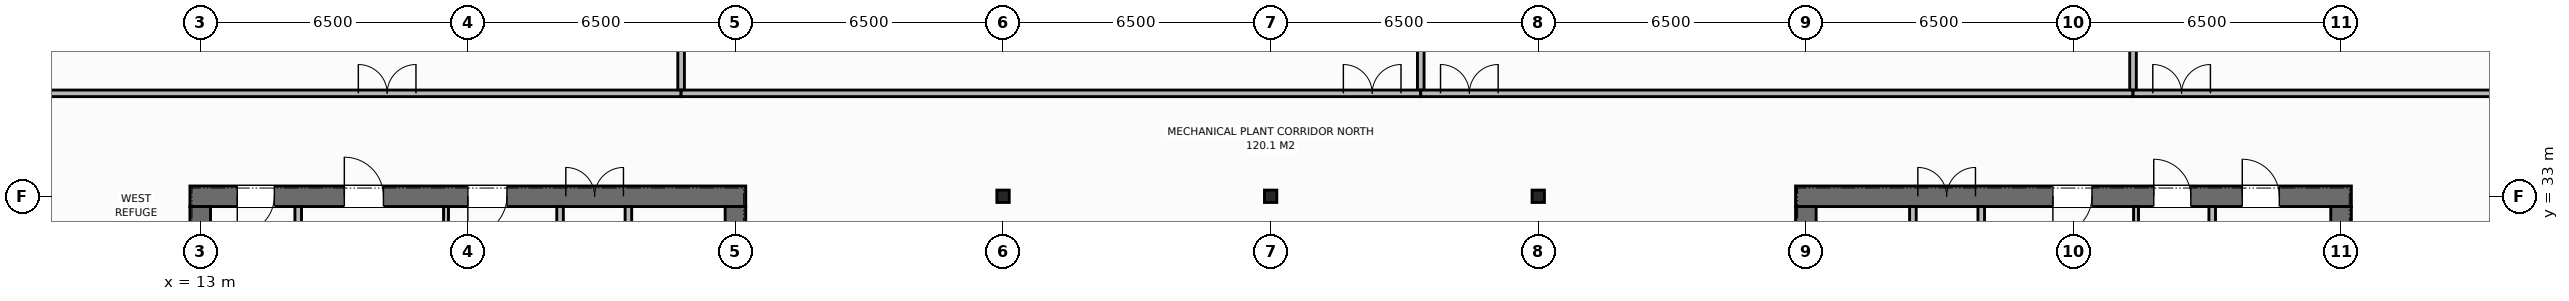
"""IFC4 building model, lengths in metres.
Left out: names, types, materials, properties, quantities, classifications, styles, units other than length and angle.
Written with IfcOpenShell. Run it as: python <this file> out.ifc"""

import sys

from ifc_helpers import new_model, si_unit, direction, frame, frame_2d, origin, origin_2d, place, context, subcontext, project, spatial, rectangle, i_section, extrude, element, fill, save


model = new_model("IFC4")
c1 = context("Model", 3, precision=1e-05, world=origin(), true_north=direction((0.0, 1.0)))
c2 = subcontext(c1, "Body", "Model", "MODEL_VIEW")
j1 = project(units=[si_unit("LENGTHUNIT", "METRE"), si_unit("PLANEANGLEUNIT", "RADIAN")], contexts=[c1])
p1 = place(None, origin())
s1 = spatial("IfcSite", under=j1, at=p1, CompositionType="ELEMENT")
p2 = place(p1, origin())
s2 = spatial("IfcBuilding", under=s1, at=p2, CompositionType="ELEMENT")
p3 = place(p2, frame((0.0, 0.0, 310.4)))
s3 = spatial("IfcBuildingStorey", under=s2, at=p3, CompositionType="ELEMENT", Elevation=310.4)
p4 = place(p3, frame((12.75, 33.0, 0.0), z_axis=(0.0, 0.0, 1.0), x_axis=(1.0, 0.0, 0.0)))
e1 = element("IfcWall", 1, at=p4, inside=s3, PredefinedType="SHEAR", context=c2, shape_type="SweptSolid", body=[
    extrude(rectangle(XDim=13.5, YDim=0.5, at=frame_2d((6.75, 0.0))), origin(), (0.0, 0.0, 1.0), 5.0),
])
p5 = place(p4, frame((1.15, 0.0, 0.0)))
e2 = element("IfcOpeningElement", 2, at=p5, cuts=e1, PredefinedType="OPENING", context=c2, shape_type="SweptSolid", body=[
    extrude(rectangle(XDim=0.9, YDim=2.15, at=frame_2d((0.45, 1.075))), frame((0.0, 0.26, 0.0), z_axis=(0.0, -1.0, 0.0), x_axis=(1.0, 0.0, 0.0)), (0.0, 0.0, 1.0), 0.52),
])
p6 = place(p4, frame((3.75, 0.0, 0.0)))
e3 = element("IfcOpeningElement", 3, at=p6, cuts=e1, PredefinedType="OPENING", context=c2, shape_type="SweptSolid", body=[
    extrude(rectangle(XDim=0.95, YDim=2.15, at=frame_2d((0.475, 1.075))), frame((0.0, 0.26, 0.0), z_axis=(0.0, -1.0, 0.0), x_axis=(1.0, 0.0, 0.0)), (0.0, 0.0, 1.0), 0.52),
])
p7 = place(p4, frame((6.75, 0.0, 0.0)))
e4 = element("IfcOpeningElement", 4, at=p7, cuts=e1, PredefinedType="OPENING", context=c2, shape_type="SweptSolid", body=[
    extrude(rectangle(XDim=0.95, YDim=2.15, at=frame_2d((0.475, 1.075))), frame((0.0, 0.26, 0.0), z_axis=(0.0, -1.0, 0.0), x_axis=(1.0, 0.0, 0.0)), (0.0, 0.0, 1.0), 0.52),
])
p8 = place(p4, frame((9.13, 0.0, 0.0)))
e5 = element("IfcOpeningElement", 5, at=p8, cuts=e1, PredefinedType="OPENING", context=c2, shape_type="SweptSolid", body=[
    extrude(rectangle(XDim=1.4, YDim=2.2, at=frame_2d((0.7, 1.1))), frame((0.0, 0.26, 0.0), z_axis=(0.0, -1.0, 0.0), x_axis=(1.0, 0.0, 0.0)), (0.0, 0.0, 1.0), 0.52),
])
p9 = place(p3, frame((13.0, 19.25, 0.0), z_axis=(0.0, 0.0, 1.0), x_axis=(0.0, 1.0, 0.0)))
e6 = element("IfcWall", 6, at=p9, inside=s3, PredefinedType="SHEAR", context=c2, shape_type="SweptSolid", body=[
    extrude(rectangle(XDim=13.5, YDim=0.5, at=frame_2d((6.75, 0.0))), origin(), (0.0, 0.0, 1.0), 5.0),
])
p10 = place(p9, frame((4.8, 0.0, 0.0)))
e7 = element("IfcOpeningElement", 7, at=p10, cuts=e6, PredefinedType="OPENING", context=c2, shape_type="SweptSolid", body=[
    extrude(rectangle(XDim=1.4, YDim=2.2, at=frame_2d((0.7, 1.1))), frame((0.0, 0.26, 0.0), z_axis=(0.0, -1.0, 0.0), x_axis=(1.0, 0.0, 0.0)), (0.0, 0.0, 1.0), 0.52),
])
p11 = place(p3, frame((26.0, 19.25, 0.0), z_axis=(0.0, 0.0, 1.0), x_axis=(0.0, 1.0, 0.0)))
e8 = element("IfcWall", 8, at=p11, inside=s3, PredefinedType="SHEAR", context=c2, shape_type="SweptSolid", body=[
    extrude(rectangle(XDim=13.5, YDim=0.5, at=frame_2d((6.75, 0.0))), origin(), (0.0, 0.0, 1.0), 5.0),
])
p12 = place(p3, frame((51.75, 33.0, 0.0), z_axis=(0.0, 0.0, 1.0), x_axis=(1.0, 0.0, 0.0)))
e9 = element("IfcWall", 9, at=p12, inside=s3, PredefinedType="SHEAR", context=c2, shape_type="SweptSolid", body=[
    extrude(rectangle(XDim=13.5, YDim=0.5, at=frame_2d((6.75, 0.0))), origin(), (0.0, 0.0, 1.0), 5.0),
])
p13 = place(p12, frame((2.97, 0.0, 0.0)))
e10 = element("IfcOpeningElement", 10, at=p13, cuts=e9, PredefinedType="OPENING", context=c2, shape_type="SweptSolid", body=[
    extrude(rectangle(XDim=1.4, YDim=2.2, at=frame_2d((0.7, 1.1))), frame((0.0, 0.26, 0.0), z_axis=(0.0, -1.0, 0.0), x_axis=(1.0, 0.0, 0.0)), (0.0, 0.0, 1.0), 0.52),
])
p14 = place(p12, frame((10.85, 0.0, 0.0)))
e11 = element("IfcOpeningElement", 11, at=p14, cuts=e9, PredefinedType="OPENING", context=c2, shape_type="SweptSolid", body=[
    extrude(rectangle(XDim=0.9, YDim=2.15, at=frame_2d((0.45, 1.075))), frame((0.0, 0.26, 0.0), z_axis=(0.0, -1.0, 0.0), x_axis=(1.0, 0.0, 0.0)), (0.0, 0.0, 1.0), 0.52),
])
p15 = place(p12, frame((6.25, 0.0, 0.0)))
e12 = element("IfcOpeningElement", 12, at=p15, cuts=e9, PredefinedType="OPENING", context=c2, shape_type="SweptSolid", body=[
    extrude(rectangle(XDim=0.95, YDim=2.15, at=frame_2d((0.475, 1.075))), frame((0.0, 0.26, 0.0), z_axis=(0.0, -1.0, 0.0), x_axis=(1.0, 0.0, 0.0)), (0.0, 0.0, 1.0), 0.52),
])
p16 = place(p12, frame((8.7, 0.0, 0.0)))
e13 = element("IfcOpeningElement", 13, at=p16, cuts=e9, PredefinedType="OPENING", context=c2, shape_type="SweptSolid", body=[
    extrude(rectangle(XDim=0.9, YDim=2.15, at=frame_2d((0.45, 1.075))), frame((0.0, 0.26, 0.0), z_axis=(0.0, -1.0, 0.0), x_axis=(1.0, 0.0, 0.0)), (0.0, 0.0, 1.0), 0.52),
])
p17 = place(p3, frame((52.0, 19.25, 0.0), z_axis=(0.0, 0.0, 1.0), x_axis=(0.0, 1.0, 0.0)))
e14 = element("IfcWall", 14, at=p17, inside=s3, PredefinedType="SHEAR", context=c2, shape_type="SweptSolid", body=[
    extrude(rectangle(XDim=13.5, YDim=0.5, at=frame_2d((6.75, 0.0))), origin(), (0.0, 0.0, 1.0), 5.0),
])
p18 = place(p3, frame((65.0, 19.25, 0.0), z_axis=(0.0, 0.0, 1.0), x_axis=(0.0, 1.0, 0.0)))
e15 = element("IfcWall", 15, at=p18, inside=s3, PredefinedType="SHEAR", context=c2, shape_type="SweptSolid", body=[
    extrude(rectangle(XDim=13.5, YDim=0.5, at=frame_2d((6.75, 0.0))), origin(), (0.0, 0.0, 1.0), 5.0),
])
p19 = place(p18, frame((8.2, 0.0, 0.0)))
e16 = element("IfcOpeningElement", 16, at=p19, cuts=e15, PredefinedType="OPENING", context=c2, shape_type="SweptSolid", body=[
    extrude(rectangle(XDim=1.3, YDim=2.2, at=frame_2d((0.65, 1.1))), frame((0.0, 0.26, 0.0), z_axis=(0.0, -1.0, 0.0), x_axis=(1.0, 0.0, 0.0)), (0.0, 0.0, 1.0), 0.52),
])
for number, where, z_axis, x_axis in (
    (17, (32.5, 33.0, 0.0), (0.0, 0.0, 1.0), (1.0, 0.0, 0.0)),
    (18, (39.0, 33.0, 0.0), (0.0, 0.0, 1.0), (1.0, 0.0, 0.0)),
    (19, (45.5, 33.0, 0.0), (0.0, 0.0, 1.0), (1.0, 0.0, 0.0)),
):
    element("IfcColumn", number, at=place(p3, frame(where, z_axis=z_axis, x_axis=x_axis)), inside=s3, PredefinedType="COLUMN", context=c2, shape_type="SweptSolid", body=[
        extrude(i_section(OverallWidth=0.3, OverallDepth=0.3, WebThickness=0.011, FlangeThickness=0.019, at=origin_2d()), origin(), (0.0, 0.0, 1.0), 5.0),
    ])
p20 = place(p3, frame((15.38, 26.56, 0.0), z_axis=(0.0, 0.0, 1.0), x_axis=(0.0, 1.0, 0.0)))
e20 = element("IfcWall", 20, at=p20, inside=s3, PredefinedType="STANDARD", context=c2, shape_type="SweptSolid", body=[
    extrude(rectangle(XDim=6.19, YDim=0.16, at=frame_2d((3.095, 0.0))), origin(), (0.0, 0.0, 1.0), 4.72),
])
p21 = place(p3, frame((18.97, 26.56, 0.0), z_axis=(0.0, 0.0, 1.0), x_axis=(0.0, 1.0, 0.0)))
e21 = element("IfcWall", 21, at=p21, inside=s3, PredefinedType="PARTITIONING", context=c2, shape_type="SweptSolid", body=[
    extrude(rectangle(XDim=6.19, YDim=0.12, at=frame_2d((3.095, 0.0))), origin(), (0.0, 0.0, 1.0), 4.72),
])
p22 = place(p3, frame((21.74, 26.56, 0.0), z_axis=(0.0, 0.0, 1.0), x_axis=(0.0, 1.0, 0.0)))
e22 = element("IfcWall", 22, at=p22, inside=s3, PredefinedType="STANDARD", context=c2, shape_type="SweptSolid", body=[
    extrude(rectangle(XDim=6.19, YDim=0.16, at=frame_2d((3.095, 0.0))), origin(), (0.0, 0.0, 1.0), 4.72),
])
p23 = place(p3, frame((23.4, 19.25, 0.0), z_axis=(0.0, 0.0, 1.0), x_axis=(0.0, 1.0, 0.0)))
e23 = element("IfcWall", 23, at=p23, inside=s3, PredefinedType="STANDARD", context=c2, shape_type="SweptSolid", body=[
    extrude(rectangle(XDim=13.5, YDim=0.16, at=frame_2d((6.75, 0.0))), origin(), (0.0, 0.0, 1.0), 4.72),
])
p24 = place(p23, frame((2.25, 0.0, 0.0)))
e24 = element("IfcOpeningElement", 24, at=p24, cuts=e23, PredefinedType="OPENING", context=c2, shape_type="SweptSolid", body=[
    extrude(rectangle(XDim=0.95, YDim=2.15, at=frame_2d((0.475, 1.075))), frame((0.0, 0.09, 0.0), z_axis=(0.0, -1.0, 0.0), x_axis=(1.0, 0.0, 0.0)), (0.0, 0.0, 1.0), 0.18),
])
p25 = place(p23, frame((6.35, 0.0, 0.0)))
e25 = element("IfcOpeningElement", 25, at=p25, cuts=e23, PredefinedType="OPENING", context=c2, shape_type="SweptSolid", body=[
    extrude(rectangle(XDim=0.95, YDim=2.15, at=frame_2d((0.475, 1.075))), frame((0.0, 0.09, 0.0), z_axis=(0.0, -1.0, 0.0), x_axis=(1.0, 0.0, 0.0)), (0.0, 0.0, 1.0), 0.18),
])
p26 = place(p23, frame((9.95, 0.0, 0.0)))
e26 = element("IfcOpeningElement", 26, at=p26, cuts=e23, PredefinedType="OPENING", context=c2, shape_type="SweptSolid", body=[
    extrude(rectangle(XDim=0.95, YDim=2.15, at=frame_2d((0.475, 1.075))), frame((0.0, 0.09, 0.0), z_axis=(0.0, -1.0, 0.0), x_axis=(1.0, 0.0, 0.0)), (0.0, 0.0, 1.0), 0.18),
])
p27 = place(p3, frame((54.6, 19.25, 0.0), z_axis=(0.0, 0.0, 1.0), x_axis=(0.0, 1.0, 0.0)))
e27 = element("IfcWall", 27, at=p27, inside=s3, PredefinedType="STANDARD", context=c2, shape_type="SweptSolid", body=[
    extrude(rectangle(XDim=13.5, YDim=0.16, at=frame_2d((6.75, 0.0))), origin(), (0.0, 0.0, 1.0), 4.72),
])
p28 = place(p27, frame((2.15, 0.0, 0.0)))
e28 = element("IfcOpeningElement", 28, at=p28, cuts=e27, PredefinedType="OPENING", context=c2, shape_type="SweptSolid", body=[
    extrude(rectangle(XDim=0.95, YDim=2.15, at=frame_2d((0.475, 1.075))), frame((0.0, 0.09, 0.0), z_axis=(0.0, -1.0, 0.0), x_axis=(1.0, 0.0, 0.0)), (0.0, 0.0, 1.0), 0.18),
])
p29 = place(p27, frame((6.25, 0.0, 0.0)))
e29 = element("IfcOpeningElement", 29, at=p29, cuts=e27, PredefinedType="OPENING", context=c2, shape_type="SweptSolid", body=[
    extrude(rectangle(XDim=0.95, YDim=2.15, at=frame_2d((0.475, 1.075))), frame((0.0, 0.09, 0.0), z_axis=(0.0, -1.0, 0.0), x_axis=(1.0, 0.0, 0.0)), (0.0, 0.0, 1.0), 0.18),
])
p30 = place(p27, frame((9.95, 0.0, 0.0)))
e30 = element("IfcOpeningElement", 30, at=p30, cuts=e27, PredefinedType="OPENING", context=c2, shape_type="SweptSolid", body=[
    extrude(rectangle(XDim=0.95, YDim=2.15, at=frame_2d((0.475, 1.075))), frame((0.0, 0.09, 0.0), z_axis=(0.0, -1.0, 0.0), x_axis=(1.0, 0.0, 0.0)), (0.0, 0.0, 1.0), 0.18),
])
p31 = place(p3, frame((56.26, 23.09, 0.0), z_axis=(0.0, 0.0, 1.0), x_axis=(0.0, 1.0, 0.0)))
e31 = element("IfcWall", 31, at=p31, inside=s3, PredefinedType="STANDARD", context=c2, shape_type="SweptSolid", body=[
    extrude(rectangle(XDim=9.66, YDim=0.16, at=frame_2d((4.83, 0.0))), origin(), (0.0, 0.0, 1.0), 4.72),
])
p32 = place(p31, frame((1.01, 0.0, 0.0)))
e32 = element("IfcOpeningElement", 32, at=p32, cuts=e31, PredefinedType="OPENING", context=c2, shape_type="SweptSolid", body=[
    extrude(rectangle(XDim=1.3, YDim=2.2, at=frame_2d((0.65, 1.1))), frame((0.0, 0.09, 0.0), z_axis=(0.0, -1.0, 0.0), x_axis=(1.0, 0.0, 0.0)), (0.0, 0.0, 1.0), 0.18),
])
p33 = place(p3, frame((61.87, 26.56, 0.0), z_axis=(0.0, 0.0, 1.0), x_axis=(0.0, 1.0, 0.0)))
e33 = element("IfcWall", 33, at=p33, inside=s3, PredefinedType="STANDARD", context=c2, shape_type="SweptSolid", body=[
    extrude(rectangle(XDim=6.19, YDim=0.16, at=frame_2d((3.095, 0.0))), origin(), (0.0, 0.0, 1.0), 4.72),
])
p34 = place(p3, frame((60.02, 26.56, 0.0), z_axis=(0.0, 0.0, 1.0), x_axis=(0.0, 1.0, 0.0)))
e34 = element("IfcWall", 34, at=p34, inside=s3, PredefinedType="PARTITIONING", context=c2, shape_type="SweptSolid", body=[
    extrude(rectangle(XDim=6.19, YDim=0.12, at=frame_2d((3.095, 0.0))), origin(), (0.0, 0.0, 1.0), 4.72),
])
p35 = place(p3, frame((24.68, 35.5, 0.0), z_axis=(0.0, 0.0, 1.0), x_axis=(0.0, 1.0, 0.0)))
e35 = element("IfcWall", 35, at=p35, inside=s3, PredefinedType="STANDARD", context=c2, shape_type="SweptSolid", body=[
    extrude(rectangle(XDim=11.38, YDim=0.16, at=frame_2d((5.69, 0.0))), origin(), (0.0, 0.0, 1.0), 4.72),
])
p36 = place(p3, frame((7.22, 35.5, 0.0), z_axis=(0.0, 0.0, 1.0), x_axis=(1.0, 0.0, 0.0)))
e36 = element("IfcWall", 36, at=p36, inside=s3, PredefinedType="STANDARD", context=c2, shape_type="SweptSolid", body=[
    extrude(rectangle(XDim=17.46, YDim=0.16, at=frame_2d((8.73, 0.0))), origin(), (0.0, 0.0, 1.0), 4.72),
])
p37 = place(p36, frame((9.62, 0.0, 0.0)))
e37 = element("IfcOpeningElement", 37, at=p37, cuts=e36, PredefinedType="OPENING", context=c2, shape_type="SweptSolid", body=[
    extrude(rectangle(XDim=1.4, YDim=2.2, at=frame_2d((0.7, 1.1))), frame((0.0, 0.09, 0.0), z_axis=(0.0, -1.0, 0.0), x_axis=(1.0, 0.0, 0.0)), (0.0, 0.0, 1.0), 0.18),
])
p38 = place(p3, frame((42.646, 35.5, 0.0), z_axis=(0.0, 0.0, 1.0), x_axis=(0.0, 1.0, 0.0)))
e38 = element("IfcWall", 38, at=p38, inside=s3, PredefinedType="STANDARD", context=c2, shape_type="SweptSolid", body=[
    extrude(rectangle(XDim=11.38, YDim=0.16, at=frame_2d((5.69, 0.0))), origin(), (0.0, 0.0, 1.0), 4.72),
])
p39 = place(p3, frame((24.68, 35.5, 0.0), z_axis=(0.0, 0.0, 1.0), x_axis=(1.0, 0.0, 0.0)))
e39 = element("IfcWall", 39, at=p39, inside=s3, PredefinedType="STANDARD", context=c2, shape_type="SweptSolid", body=[
    extrude(rectangle(XDim=17.966, YDim=0.16, at=frame_2d((8.983, 0.0))), origin(), (0.0, 0.0, 1.0), 4.72),
])
p40 = place(p39, frame((16.086, 0.0, 0.0)))
e40 = element("IfcOpeningElement", 40, at=p40, cuts=e39, PredefinedType="OPENING", context=c2, shape_type="SweptSolid", body=[
    extrude(rectangle(XDim=1.4, YDim=2.2, at=frame_2d((0.7, 1.1))), frame((0.0, 0.09, 0.0), z_axis=(0.0, -1.0, 0.0), x_axis=(1.0, 0.0, 0.0)), (0.0, 0.0, 1.0), 0.18),
])
p41 = place(p3, frame((59.947, 35.5, 0.0), z_axis=(0.0, 0.0, 1.0), x_axis=(0.0, 1.0, 0.0)))
e41 = element("IfcWall", 41, at=p41, inside=s3, PredefinedType="STANDARD", context=c2, shape_type="SweptSolid", body=[
    extrude(rectangle(XDim=11.38, YDim=0.16, at=frame_2d((5.69, 0.0))), origin(), (0.0, 0.0, 1.0), 4.72),
])
p42 = place(p3, frame((42.646, 35.5, 0.0), z_axis=(0.0, 0.0, 1.0), x_axis=(1.0, 0.0, 0.0)))
e42 = element("IfcWall", 42, at=p42, inside=s3, PredefinedType="STANDARD", context=c2, shape_type="SweptSolid", body=[
    extrude(rectangle(XDim=17.3, YDim=0.16, at=frame_2d((8.65, 0.0))), origin(), (0.0, 0.0, 1.0), 4.72),
])
p43 = place(p42, frame((0.48, 0.0, 0.0)))
e43 = element("IfcOpeningElement", 43, at=p43, cuts=e42, PredefinedType="OPENING", context=c2, shape_type="SweptSolid", body=[
    extrude(rectangle(XDim=1.4, YDim=2.2, at=frame_2d((0.7, 1.1))), frame((0.0, 0.09, 0.0), z_axis=(0.0, -1.0, 0.0), x_axis=(1.0, 0.0, 0.0)), (0.0, 0.0, 1.0), 0.18),
])
p44 = place(p3, frame((59.947, 35.5, 0.0), z_axis=(0.0, 0.0, 1.0), x_axis=(1.0, 0.0, 0.0)))
e44 = element("IfcWall", 44, at=p44, inside=s3, PredefinedType="STANDARD", context=c2, shape_type="SweptSolid", body=[
    extrude(rectangle(XDim=14.134, YDim=0.16, at=frame_2d((7.067, 0.0))), origin(), (0.0, 0.0, 1.0), 4.72),
])
p45 = place(p44, frame((0.48, 0.0, 0.0)))
e45 = element("IfcOpeningElement", 45, at=p45, cuts=e44, PredefinedType="OPENING", context=c2, shape_type="SweptSolid", body=[
    extrude(rectangle(XDim=1.4, YDim=2.2, at=frame_2d((0.7, 1.1))), frame((0.0, 0.09, 0.0), z_axis=(0.0, -1.0, 0.0), x_axis=(1.0, 0.0, 0.0)), (0.0, 0.0, 1.0), 0.18),
])
p46 = place(p5, origin())
e46 = element("IfcDoor", 46, at=p46, inside=s3, OperationType="SINGLE_SWING_RIGHT", PredefinedType="DOOR", context=c2, shape_type="SweptSolid", body=[
    extrude(rectangle(XDim=0.9, YDim=2.15, at=frame_2d((0.45, 1.075))), frame((0.0, -0.025, 0.0), z_axis=(0.0, -1.0, 0.0), x_axis=(1.0, 0.0, 0.0)), (0.0, 0.0, 1.0), 0.05),
])
fill(e2, e46)
p47 = place(p6, origin())
e47 = element("IfcDoor", 47, at=p47, inside=s3, OperationType="SINGLE_SWING_LEFT", PredefinedType="DOOR", context=c2, shape_type="SweptSolid", body=[
    extrude(rectangle(XDim=0.95, YDim=2.15, at=frame_2d((0.475, 1.075))), frame((0.0, -0.025, 0.0), z_axis=(0.0, -1.0, 0.0), x_axis=(1.0, 0.0, 0.0)), (0.0, 0.0, 1.0), 0.05),
])
fill(e3, e47)
p48 = place(p7, origin())
e48 = element("IfcDoor", 48, at=p48, inside=s3, OperationType="SINGLE_SWING_RIGHT", PredefinedType="DOOR", context=c2, shape_type="SweptSolid", body=[
    extrude(rectangle(XDim=0.95, YDim=2.15, at=frame_2d((0.475, 1.075))), frame((0.0, -0.025, 0.0), z_axis=(0.0, -1.0, 0.0), x_axis=(1.0, 0.0, 0.0)), (0.0, 0.0, 1.0), 0.05),
])
fill(e4, e48)
p49 = place(p8, origin())
e49 = element("IfcDoor", 49, at=p49, inside=s3, OperationType="DOUBLE_DOOR_SINGLE_SWING", PredefinedType="DOOR", context=c2, shape_type="SweptSolid", body=[
    extrude(rectangle(XDim=1.4, YDim=2.2, at=frame_2d((0.7, 1.1))), frame((0.0, -0.025, 0.0), z_axis=(0.0, -1.0, 0.0), x_axis=(1.0, 0.0, 0.0)), (0.0, 0.0, 1.0), 0.05),
])
fill(e5, e49)
p50 = place(p13, origin())
e50 = element("IfcDoor", 50, at=p50, inside=s3, OperationType="DOUBLE_DOOR_SINGLE_SWING", PredefinedType="DOOR", context=c2, shape_type="SweptSolid", body=[
    extrude(rectangle(XDim=1.4, YDim=2.2, at=frame_2d((0.7, 1.1))), frame((0.0, -0.025, 0.0), z_axis=(0.0, -1.0, 0.0), x_axis=(1.0, 0.0, 0.0)), (0.0, 0.0, 1.0), 0.05),
])
fill(e10, e50)
p51 = place(p14, origin())
e51 = element("IfcDoor", 51, at=p51, inside=s3, OperationType="SINGLE_SWING_LEFT", PredefinedType="DOOR", context=c2, shape_type="SweptSolid", body=[
    extrude(rectangle(XDim=0.9, YDim=2.15, at=frame_2d((0.45, 1.075))), frame((0.0, -0.025, 0.0), z_axis=(0.0, -1.0, 0.0), x_axis=(1.0, 0.0, 0.0)), (0.0, 0.0, 1.0), 0.05),
])
fill(e11, e51)
p52 = place(p15, origin())
e52 = element("IfcDoor", 52, at=p52, inside=s3, OperationType="SINGLE_SWING_RIGHT", PredefinedType="DOOR", context=c2, shape_type="SweptSolid", body=[
    extrude(rectangle(XDim=0.95, YDim=2.15, at=frame_2d((0.475, 1.075))), frame((0.0, -0.025, 0.0), z_axis=(0.0, -1.0, 0.0), x_axis=(1.0, 0.0, 0.0)), (0.0, 0.0, 1.0), 0.05),
])
fill(e12, e52)
p53 = place(p16, origin())
e53 = element("IfcDoor", 53, at=p53, inside=s3, OperationType="SINGLE_SWING_LEFT", PredefinedType="DOOR", context=c2, shape_type="SweptSolid", body=[
    extrude(rectangle(XDim=0.9, YDim=2.15, at=frame_2d((0.45, 1.075))), frame((0.0, -0.025, 0.0), z_axis=(0.0, -1.0, 0.0), x_axis=(1.0, 0.0, 0.0)), (0.0, 0.0, 1.0), 0.05),
])
fill(e13, e53)
p54 = place(p37, origin())
e54 = element("IfcDoor", 54, at=p54, inside=s3, OperationType="DOUBLE_DOOR_SINGLE_SWING", PredefinedType="DOOR", context=c2, shape_type="SweptSolid", body=[
    extrude(rectangle(XDim=1.4, YDim=2.2, at=frame_2d((0.7, 1.1))), frame((0.0, 0.025, 0.0), z_axis=(0.0, -1.0, 0.0), x_axis=(1.0, 0.0, 0.0)), (0.0, 0.0, 1.0), 0.05),
])
fill(e37, e54)
p55 = place(p40, origin())
e55 = element("IfcDoor", 55, at=p55, inside=s3, OperationType="DOUBLE_DOOR_SINGLE_SWING", PredefinedType="DOOR", context=c2, shape_type="SweptSolid", body=[
    extrude(rectangle(XDim=1.4, YDim=2.2, at=frame_2d((0.7, 1.1))), frame((0.0, 0.025, 0.0), z_axis=(0.0, -1.0, 0.0), x_axis=(1.0, 0.0, 0.0)), (0.0, 0.0, 1.0), 0.05),
])
fill(e40, e55)
p56 = place(p43, origin())
e56 = element("IfcDoor", 56, at=p56, inside=s3, OperationType="DOUBLE_DOOR_SINGLE_SWING", PredefinedType="DOOR", context=c2, shape_type="SweptSolid", body=[
    extrude(rectangle(XDim=1.4, YDim=2.2, at=frame_2d((0.7, 1.1))), frame((0.0, 0.025, 0.0), z_axis=(0.0, -1.0, 0.0), x_axis=(1.0, 0.0, 0.0)), (0.0, 0.0, 1.0), 0.05),
])
fill(e43, e56)
p57 = place(p45, origin())
e57 = element("IfcDoor", 57, at=p57, inside=s3, OperationType="DOUBLE_DOOR_SINGLE_SWING", PredefinedType="DOOR", context=c2, shape_type="SweptSolid", body=[
    extrude(rectangle(XDim=1.4, YDim=2.2, at=frame_2d((0.7, 1.1))), frame((0.0, 0.025, 0.0), z_axis=(0.0, -1.0, 0.0), x_axis=(1.0, 0.0, 0.0)), (0.0, 0.0, 1.0), 0.05),
])
fill(e45, e57)
save(model, sys.argv[1])
